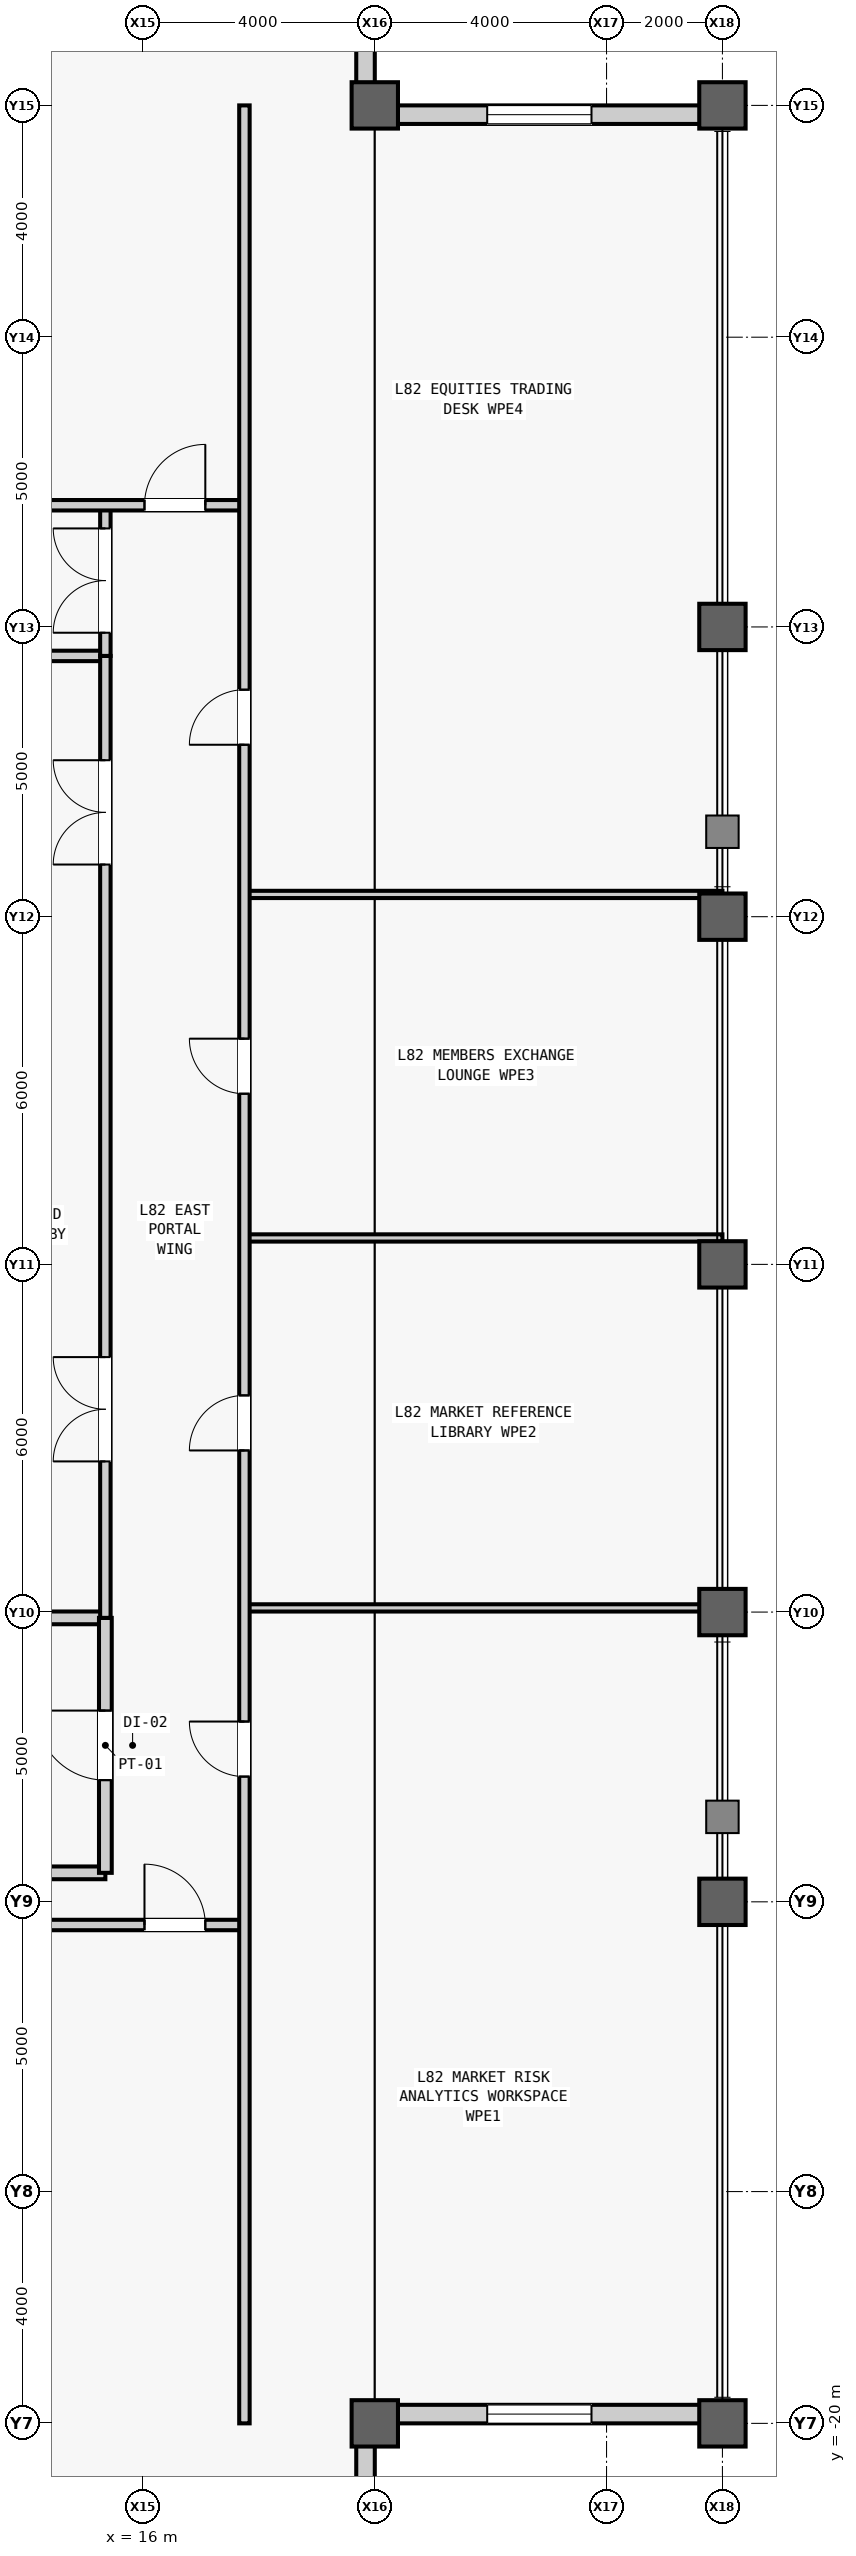
"""IFC4 building model, lengths in metres.
Left out: names, types, materials, properties, quantities, classifications, styles, units other than length and angle.
Written with IfcOpenShell. Run it as: python <this file> out.ifc"""

import sys

from ifc_helpers import new_model, si_unit, direction, frame, frame_2d, origin, origin_2d, place, context, subcontext, project, spatial, rectangle, hollow_rectangle, extrude, source, transform, mapped, element, fill, save


model = new_model("IFC4")
c1 = context("Model", 3, precision=1e-05, world=origin(), true_north=direction((0.0, 1.0)))
c2 = subcontext(c1, "Body", "Model", "MODEL_VIEW")
j1 = project(units=[si_unit("LENGTHUNIT", "METRE"), si_unit("PLANEANGLEUNIT", "RADIAN")], contexts=[c1])
p1 = place(None, origin())
s1 = spatial("IfcSite", under=j1, at=p1, CompositionType="ELEMENT")
p2 = place(p1, origin())
s2 = spatial("IfcBuilding", under=s1, at=p2, CompositionType="ELEMENT")
p3 = place(p2, frame((0.0, 0.0, 346.3)))
s3 = spatial("IfcBuildingStorey", under=s2, at=p3, CompositionType="ELEMENT", Elevation=346.3)
m1 = source(origin(), c2, "Body", "SweptSolid", [
    extrude(hollow_rectangle(XDim=0.8, YDim=0.8, WallThickness=0.045, at=origin_2d()), origin(), (0.0, 0.0, 1.0), 4.0),
])
for number, where, z_axis, x_axis in (
    (1, (20.0, -20.0, 0.0), (0.0, 0.0, 1.0), (1.0, 0.0, 0.0)),
    (2, (20.0, 20.0, 0.0), (0.0, 0.0, 1.0), (1.0, 0.0, 0.0)),
    (3, (26.0, -20.0, 0.0), (0.0, 0.0, 1.0), (1.0, 0.0, 0.0)),
    (4, (26.0, -11.0, 0.0), (0.0, 0.0, 1.0), (1.0, 0.0, 0.0)),
    (5, (26.0, -6.0, 0.0), (0.0, 0.0, 1.0), (1.0, 0.0, 0.0)),
    (6, (26.0, 0.0, 0.0), (0.0, 0.0, 1.0), (1.0, 0.0, 0.0)),
    (7, (26.0, 6.0, 0.0), (0.0, 0.0, 1.0), (1.0, 0.0, 0.0)),
    (8, (26.0, 11.0, 0.0), (0.0, 0.0, 1.0), (1.0, 0.0, 0.0)),
    (9, (26.0, 20.0, 0.0), (0.0, 0.0, 1.0), (1.0, 0.0, 0.0)),
):
    element("IfcColumn", number, at=place(p3, frame(where, z_axis=z_axis, x_axis=x_axis)), inside=s3, PredefinedType="COLUMN", context=c2, shape_type="MappedRepresentation", body=[
        mapped(m1, transform((0.0, 0.0, 0.0), scale=1.0)),
    ])
m2 = source(origin(), c2, "Body", "SweptSolid", [
    extrude(rectangle(XDim=5.68, YDim=0.32, at=frame_2d((2.84, 0.0))), origin(), (0.0, 0.0, 1.0), 3.191),
])
p4 = place(p3, frame((19.84, -25.68, 0.0), z_axis=(0.0, 0.0, 1.0), x_axis=(0.0, 1.0, 0.0)))
e10 = element("IfcWall", 10, at=p4, inside=s3, PredefinedType="STANDARD", context=c2, shape_type="MappedRepresentation", body=[
    mapped(m2, transform((0.0, 0.0, 0.0), scale=1.0)),
])
m3 = source(origin(), c2, "Body", "SweptSolid", [
    extrude(rectangle(XDim=1.8, YDim=2.4, at=frame_2d((0.9, 1.2))), frame((0.0, 0.17, 0.0), z_axis=(0.0, -1.0, 0.0), x_axis=(1.0, 0.0, 0.0)), (0.0, 0.0, 1.0), 0.34),
])
p5 = place(p4, frame((1.94, 0.0, 0.5)))
e11 = element("IfcOpeningElement", 11, at=p5, cuts=e10, PredefinedType="OPENING", context=c2, shape_type="MappedRepresentation", body=[
    mapped(m3, transform((0.0, 0.0, 0.0), scale=1.0)),
])
p6 = place(p3, frame((20.0, -19.84, 0.0), z_axis=(0.0, 0.0, 1.0), x_axis=(1.0, 0.0, 0.0)))
e12 = element("IfcWall", 12, at=p6, inside=s3, PredefinedType="STANDARD", context=c2, shape_type="MappedRepresentation", body=[
    mapped(m2, transform((0.0, 0.0, 0.0), scale=1.0)),
])
p7 = place(p6, frame((1.94, 0.0, 0.5)))
e13 = element("IfcOpeningElement", 13, at=p7, cuts=e12, PredefinedType="OPENING", context=c2, shape_type="MappedRepresentation", body=[
    mapped(m3, transform((0.0, 0.0, 0.0), scale=1.0)),
])
p8 = place(p3, frame((20.0, 19.84, 0.0), z_axis=(0.0, 0.0, 1.0), x_axis=(1.0, 0.0, 0.0)))
e14 = element("IfcWall", 14, at=p8, inside=s3, PredefinedType="STANDARD", context=c2, shape_type="MappedRepresentation", body=[
    mapped(m2, transform((0.0, 0.0, 0.0), scale=1.0)),
])
p9 = place(p8, frame((1.94, 0.0, 0.5)))
e15 = element("IfcOpeningElement", 15, at=p9, cuts=e14, PredefinedType="OPENING", context=c2, shape_type="MappedRepresentation", body=[
    mapped(m3, transform((0.0, 0.0, 0.0), scale=1.0)),
])
p10 = place(p3, frame((19.84, 20.0, 0.0), z_axis=(0.0, 0.0, 1.0), x_axis=(0.0, 1.0, 0.0)))
e16 = element("IfcWall", 16, at=p10, inside=s3, PredefinedType="STANDARD", context=c2, shape_type="MappedRepresentation", body=[
    mapped(m2, transform((0.0, 0.0, 0.0), scale=1.0)),
])
p11 = place(p10, frame((1.94, 0.0, 0.5)))
e17 = element("IfcOpeningElement", 17, at=p11, cuts=e16, PredefinedType="OPENING", context=c2, shape_type="MappedRepresentation", body=[
    mapped(m3, transform((0.0, 0.0, 0.0), scale=1.0)),
])
m4 = source(origin(), c2, "Body", "SweptSolid", [
    extrude(rectangle(XDim=4.05, YDim=0.22, at=frame_2d((2.025, 0.0))), origin(), (0.0, 0.0, 1.0), 3.74),
])
p12 = place(p3, frame((11.3, -10.5, 0.0), z_axis=(0.0, 0.0, 1.0), x_axis=(1.0, 0.0, 0.0)))
e18 = element("IfcWall", 18, at=p12, inside=s3, PredefinedType="PARTITIONING", context=c2, shape_type="MappedRepresentation", body=[
    mapped(m4, transform((0.0, 0.0, 0.0), scale=1.0)),
])
m5 = source(origin(), c2, "Body", "SweptSolid", [
    extrude(rectangle(XDim=4.05, YDim=0.22, at=frame_2d((2.025, 0.0))), origin(), (0.0, 0.0, 1.0), 3.124),
])
p13 = place(p3, frame((11.3, -6.1, 0.0), z_axis=(0.0, 0.0, 1.0), x_axis=(1.0, 0.0, 0.0)))
e19 = element("IfcWall", 19, at=p13, inside=s3, PredefinedType="PARTITIONING", context=c2, shape_type="MappedRepresentation", body=[
    mapped(m5, transform((0.0, 0.0, 0.0), scale=1.0)),
])
m6 = source(origin(), c2, "Body", "SweptSolid", [
    extrude(rectangle(XDim=4.4, YDim=0.22, at=frame_2d((2.2, 0.0))), origin(), (0.0, 0.0, 1.0), 3.74),
])
p14 = place(p3, frame((15.35, -10.5, 0.0), z_axis=(0.0, 0.0, 1.0), x_axis=(0.0, 1.0, 0.0)))
e20 = element("IfcWall", 20, at=p14, inside=s3, PredefinedType="PARTITIONING", context=c2, shape_type="MappedRepresentation", body=[
    mapped(m6, transform((0.0, 0.0, 0.0), scale=1.0)),
])
m7 = source(origin(), c2, "Body", "SweptSolid", [
    extrude(rectangle(XDim=1.2, YDim=2.2, at=frame_2d((0.6, 1.1))), frame((0.0, 0.12, 0.0), z_axis=(0.0, -1.0, 0.0), x_axis=(1.0, 0.0, 0.0)), (0.0, 0.0, 1.0), 0.24),
])
p15 = place(p14, frame((1.6, 0.0, 0.0)))
e21 = element("IfcOpeningElement", 21, at=p15, cuts=e20, PredefinedType="OPENING", context=c2, shape_type="MappedRepresentation", body=[
    mapped(m7, transform((0.0, 0.0, 0.0), scale=1.0)),
])
m8 = source(origin(), c2, "Body", "SweptSolid", [
    extrude(rectangle(XDim=4.05, YDim=0.18, at=frame_2d((2.025, 0.0))), origin(), (0.0, 0.0, 1.0), 3.74),
])
p16 = place(p3, frame((11.3, 10.5, 0.0), z_axis=(0.0, 0.0, 1.0), x_axis=(1.0, 0.0, 0.0)))
e22 = element("IfcWall", 22, at=p16, inside=s3, PredefinedType="PARTITIONING", context=c2, shape_type="MappedRepresentation", body=[
    mapped(m8, transform((0.0, 0.0, 0.0), scale=1.0)),
])
m9 = source(origin(), c2, "Body", "SweptSolid", [
    extrude(rectangle(XDim=16.6, YDim=0.18, at=frame_2d((8.3, 0.0))), origin(), (0.0, 0.0, 1.0), 3.74),
])
p17 = place(p3, frame((15.35, -6.1, 0.0), z_axis=(0.0, 0.0, 1.0), x_axis=(0.0, 1.0, 0.0)))
e23 = element("IfcWall", 23, at=p17, inside=s3, PredefinedType="PARTITIONING", context=c2, shape_type="MappedRepresentation", body=[
    mapped(m9, transform((0.0, 0.0, 0.0), scale=1.0)),
])
m10 = source(origin(), c2, "Body", "SweptSolid", [
    extrude(rectangle(XDim=1.8, YDim=2.25, at=frame_2d((0.9, 1.125))), frame((0.0, 0.1, 0.0), z_axis=(0.0, -1.0, 0.0), x_axis=(1.0, 0.0, 0.0)), (0.0, 0.0, 1.0), 0.2),
])
p18 = place(p17, frame((2.7, 0.0, 0.0)))
e24 = element("IfcOpeningElement", 24, at=p18, cuts=e23, PredefinedType="OPENING", context=c2, shape_type="MappedRepresentation", body=[
    mapped(m10, transform((0.0, 0.0, 0.0), scale=1.0)),
])
p19 = place(p17, frame((13.0, 0.0, 0.0)))
e25 = element("IfcOpeningElement", 25, at=p19, cuts=e23, PredefinedType="OPENING", context=c2, shape_type="MappedRepresentation", body=[
    mapped(m10, transform((0.0, 0.0, 0.0), scale=1.0)),
])
m11 = source(origin(), c2, "Body", "SweptSolid", [
    extrude(rectangle(XDim=2.6, YDim=0.18, at=frame_2d((1.3, 0.0))), origin(), (0.0, 0.0, 1.0), 3.74),
])
p20 = place(p3, frame((15.35, 10.5, 0.0), z_axis=(0.0, 0.0, 1.0), x_axis=(0.0, 1.0, 0.0)))
e26 = element("IfcWall", 26, at=p20, inside=s3, PredefinedType="PARTITIONING", context=c2, shape_type="MappedRepresentation", body=[
    mapped(m11, transform((0.0, 0.0, 0.0), scale=1.0)),
])
p21 = place(p20, frame((0.4, 0.0, 0.0)))
e27 = element("IfcOpeningElement", 27, at=p21, cuts=e26, PredefinedType="OPENING", context=c2, shape_type="MappedRepresentation", body=[
    mapped(m10, transform((0.0, 0.0, 0.0), scale=1.0)),
])
m12 = source(origin(), c2, "Body", "SweptSolid", [
    extrude(rectangle(XDim=12.7, YDim=0.18, at=frame_2d((6.35, 0.0))), origin(), (0.0, 0.0, 1.0), 2.79),
])
p22 = place(p3, frame((5.05, -11.4, 0.0), z_axis=(0.0, 0.0, 1.0), x_axis=(1.0, 0.0, 0.0)))
e28 = element("IfcWall", 28, at=p22, inside=s3, PredefinedType="PARTITIONING", context=c2, shape_type="MappedRepresentation", body=[
    mapped(m12, transform((0.0, 0.0, 0.0), scale=1.0)),
])
m13 = source(origin(), c2, "Body", "SweptSolid", [
    extrude(rectangle(XDim=1.05, YDim=2.2, at=frame_2d((0.525, 1.1))), frame((0.0, 0.1, 0.0), z_axis=(0.0, -1.0, 0.0), x_axis=(1.0, 0.0, 0.0)), (0.0, 0.0, 1.0), 0.2),
])
p23 = place(p22, frame((10.975, 0.0, 0.0)))
e29 = element("IfcOpeningElement", 29, at=p23, cuts=e28, PredefinedType="OPENING", context=c2, shape_type="MappedRepresentation", body=[
    mapped(m13, transform((0.0, 0.0, 0.0), scale=1.0)),
])
m14 = source(origin(), c2, "Body", "SweptSolid", [
    extrude(rectangle(XDim=12.65, YDim=0.18, at=frame_2d((6.325, 0.0))), origin(), (0.0, 0.0, 1.0), 3.74),
])
p24 = place(p3, frame((5.1, 13.1, 0.0), z_axis=(0.0, 0.0, 1.0), x_axis=(1.0, 0.0, 0.0)))
e30 = element("IfcWall", 30, at=p24, inside=s3, PredefinedType="PARTITIONING", context=c2, shape_type="MappedRepresentation", body=[
    mapped(m14, transform((0.0, 0.0, 0.0), scale=1.0)),
])
p25 = place(p24, frame((10.925, 0.0, 0.0)))
e31 = element("IfcOpeningElement", 31, at=p25, cuts=e30, PredefinedType="OPENING", context=c2, shape_type="MappedRepresentation", body=[
    mapped(m13, transform((0.0, 0.0, 0.0), scale=1.0)),
])
m15 = source(origin(), c2, "Body", "SweptSolid", [
    extrude(rectangle(XDim=8.25, YDim=0.125, at=frame_2d((4.125, 0.0))), origin(), (0.0, 0.0, 1.0), 3.124),
])
p26 = place(p3, frame((17.75, -5.928, 0.0), z_axis=(0.0, 0.0, 1.0), x_axis=(1.0, 0.0, 0.0)))
e32 = element("IfcWall", 32, at=p26, inside=s3, PredefinedType="PARTITIONING", context=c2, shape_type="MappedRepresentation", body=[
    mapped(m15, transform((0.0, 0.0, 0.0), scale=1.0)),
])
m16 = source(origin(), c2, "Body", "SweptSolid", [
    extrude(rectangle(XDim=8.25, YDim=0.125, at=frame_2d((4.125, 0.0))), origin(), (0.0, 0.0, 1.0), 3.74),
])
for number, where, z_axis, x_axis in (
    (33, (17.75, 0.456, 0.0), (0.0, 0.0, 1.0), (1.0, 0.0, 0.0)),
    (34, (17.75, 6.384, 0.0), (0.0, 0.0, 1.0), (1.0, 0.0, 0.0)),
):
    element("IfcWall", number, at=place(p3, frame(where, z_axis=z_axis, x_axis=x_axis)), inside=s3, PredefinedType="PARTITIONING", context=c2, shape_type="MappedRepresentation", body=[
        mapped(m16, transform((0.0, 0.0, 0.0), scale=1.0)),
    ])
m17 = source(origin(), c2, "Body", "SweptSolid", [
    extrude(rectangle(XDim=40.0, YDim=0.18, at=frame_2d((20.0, 0.0))), origin(), (0.0, 0.0, 1.0), 3.74),
])
p27 = place(p3, frame((17.75, -20.0, 0.0), z_axis=(0.0, 0.0, 1.0), x_axis=(0.0, 1.0, 0.0)))
e35 = element("IfcWall", 35, at=p27, inside=s3, PredefinedType="PARTITIONING", context=c2, shape_type="MappedRepresentation", body=[
    mapped(m17, transform((0.0, 0.0, 0.0), scale=1.0)),
])
m18 = source(origin(), c2, "Body", "SweptSolid", [
    extrude(rectangle(XDim=0.95, YDim=2.15, at=frame_2d((0.475, 1.075))), frame((0.0, 0.1, 0.0), z_axis=(0.0, -1.0, 0.0), x_axis=(1.0, 0.0, 0.0)), (0.0, 0.0, 1.0), 0.2),
])
p28 = place(p27, frame((11.161, 0.0, 0.0)))
e36 = element("IfcOpeningElement", 36, at=p28, cuts=e35, PredefinedType="OPENING", context=c2, shape_type="MappedRepresentation", body=[
    mapped(m18, transform((0.0, 0.0, 0.0), scale=1.0)),
])
p29 = place(p27, frame((16.789, 0.0, 0.0)))
e37 = element("IfcOpeningElement", 37, at=p29, cuts=e35, PredefinedType="OPENING", context=c2, shape_type="MappedRepresentation", body=[
    mapped(m18, transform((0.0, 0.0, 0.0), scale=1.0)),
])
p30 = place(p27, frame((22.945, 0.0, 0.0)))
e38 = element("IfcOpeningElement", 38, at=p30, cuts=e35, PredefinedType="OPENING", context=c2, shape_type="MappedRepresentation", body=[
    mapped(m18, transform((0.0, 0.0, 0.0), scale=1.0)),
])
p31 = place(p27, frame((28.967, 0.0, 0.0)))
e39 = element("IfcOpeningElement", 39, at=p31, cuts=e35, PredefinedType="OPENING", context=c2, shape_type="MappedRepresentation", body=[
    mapped(m18, transform((0.0, 0.0, 0.0), scale=1.0)),
])
m19 = source(origin(), c2, "Body", "SweptSolid", [
    extrude(rectangle(XDim=1.8, YDim=2.4, at=frame_2d((0.9, 1.2))), frame((0.0, 0.03, 0.0), z_axis=(0.0, -1.0, 0.0), x_axis=(1.0, 0.0, 0.0)), (0.0, 0.0, 1.0), 0.06),
])
p32 = place(p7, origin())
e40 = element("IfcWindow", 40, at=p32, inside=s3, PartitioningType="SINGLE_PANEL", PredefinedType="WINDOW", context=c2, shape_type="MappedRepresentation", body=[
    mapped(m19, transform((0.0, 0.0, 0.0), scale=1.0)),
])
fill(e13, e40)
p33 = place(p9, origin())
e41 = element("IfcWindow", 41, at=p33, inside=s3, PartitioningType="SINGLE_PANEL", PredefinedType="WINDOW", context=c2, shape_type="MappedRepresentation", body=[
    mapped(m19, transform((0.0, 0.0, 0.0), scale=1.0)),
])
fill(e15, e41)
m20 = source(origin(), c2, "Body", "SweptSolid", [
    extrude(rectangle(XDim=1.2, YDim=2.2, at=frame_2d((0.6, 1.1))), frame((0.0, 0.025, 0.0), z_axis=(0.0, -1.0, 0.0), x_axis=(1.0, 0.0, 0.0)), (0.0, 0.0, 1.0), 0.05),
])
p34 = place(p15, origin())
e42 = element("IfcDoor", 42, at=p34, inside=s3, OperationType="SINGLE_SWING_RIGHT", PredefinedType="DOOR", context=c2, shape_type="MappedRepresentation", body=[
    mapped(m20, transform((0.0, 0.0, 0.0), scale=1.0)),
])
fill(e21, e42)
m21 = source(origin(), c2, "Body", "SweptSolid", [
    extrude(rectangle(XDim=1.8, YDim=2.25, at=frame_2d((0.9, 1.125))), frame((0.0, 0.025, 0.0), z_axis=(0.0, -1.0, 0.0), x_axis=(1.0, 0.0, 0.0)), (0.0, 0.0, 1.0), 0.05),
])
p35 = place(p18, origin())
e43 = element("IfcDoor", 43, at=p35, inside=s3, OperationType="SINGLE_SWING_RIGHT", PredefinedType="DOOR", context=c2, shape_type="MappedRepresentation", body=[
    mapped(m21, transform((0.0, 0.0, 0.0), scale=1.0)),
])
fill(e24, e43)
p36 = place(p19, origin())
e44 = element("IfcDoor", 44, at=p36, inside=s3, OperationType="SINGLE_SWING_LEFT", PredefinedType="DOOR", context=c2, shape_type="MappedRepresentation", body=[
    mapped(m21, transform((0.0, 0.0, 0.0), scale=1.0)),
])
fill(e25, e44)
p37 = place(p21, origin())
e45 = element("IfcDoor", 45, at=p37, inside=s3, OperationType="DOUBLE_DOOR_SINGLE_SWING", PredefinedType="DOOR", context=c2, shape_type="MappedRepresentation", body=[
    mapped(m21, transform((0.0, 0.0, 0.0), scale=1.0)),
])
fill(e27, e45)
m22 = source(origin(), c2, "Body", "SweptSolid", [
    extrude(rectangle(XDim=1.05, YDim=2.2, at=frame_2d((0.525, 1.1))), frame((0.0, 0.025, 0.0), z_axis=(0.0, -1.0, 0.0), x_axis=(1.0, 0.0, 0.0)), (0.0, 0.0, 1.0), 0.05),
])
p38 = place(p23, origin())
e46 = element("IfcDoor", 46, at=p38, inside=s3, OperationType="SINGLE_SWING_LEFT", PredefinedType="DOOR", context=c2, shape_type="MappedRepresentation", body=[
    mapped(m22, transform((0.0, 0.0, 0.0), scale=1.0)),
])
fill(e29, e46)
p39 = place(p25, origin())
e47 = element("IfcDoor", 47, at=p39, inside=s3, OperationType="SINGLE_SWING_RIGHT", PredefinedType="DOOR", context=c2, shape_type="MappedRepresentation", body=[
    mapped(m22, transform((0.0, 0.0, 0.0), scale=1.0)),
])
fill(e31, e47)
m23 = source(origin(), c2, "Body", "SweptSolid", [
    extrude(rectangle(XDim=0.95, YDim=2.15, at=frame_2d((0.475, 1.075))), frame((0.0, 0.025, 0.0), z_axis=(0.0, -1.0, 0.0), x_axis=(1.0, 0.0, 0.0)), (0.0, 0.0, 1.0), 0.05),
])
p40 = place(p28, origin())
e48 = element("IfcDoor", 48, at=p40, inside=s3, OperationType="SINGLE_SWING_RIGHT", PredefinedType="DOOR", context=c2, shape_type="MappedRepresentation", body=[
    mapped(m23, transform((0.0, 0.0, 0.0), scale=1.0)),
])
fill(e36, e48)
p41 = place(p29, origin())
e49 = element("IfcDoor", 49, at=p41, inside=s3, OperationType="SINGLE_SWING_LEFT", PredefinedType="DOOR", context=c2, shape_type="MappedRepresentation", body=[
    mapped(m23, transform((0.0, 0.0, 0.0), scale=1.0)),
])
fill(e37, e49)
p42 = place(p30, origin())
e50 = element("IfcDoor", 50, at=p42, inside=s3, OperationType="SINGLE_SWING_RIGHT", PredefinedType="DOOR", context=c2, shape_type="MappedRepresentation", body=[
    mapped(m23, transform((0.0, 0.0, 0.0), scale=1.0)),
])
fill(e38, e50)
p43 = place(p31, origin())
e51 = element("IfcDoor", 51, at=p43, inside=s3, OperationType="SINGLE_SWING_LEFT", PredefinedType="DOOR", context=c2, shape_type="MappedRepresentation", body=[
    mapped(m23, transform((0.0, 0.0, 0.0), scale=1.0)),
])
fill(e39, e51)
save(model, sys.argv[1])
